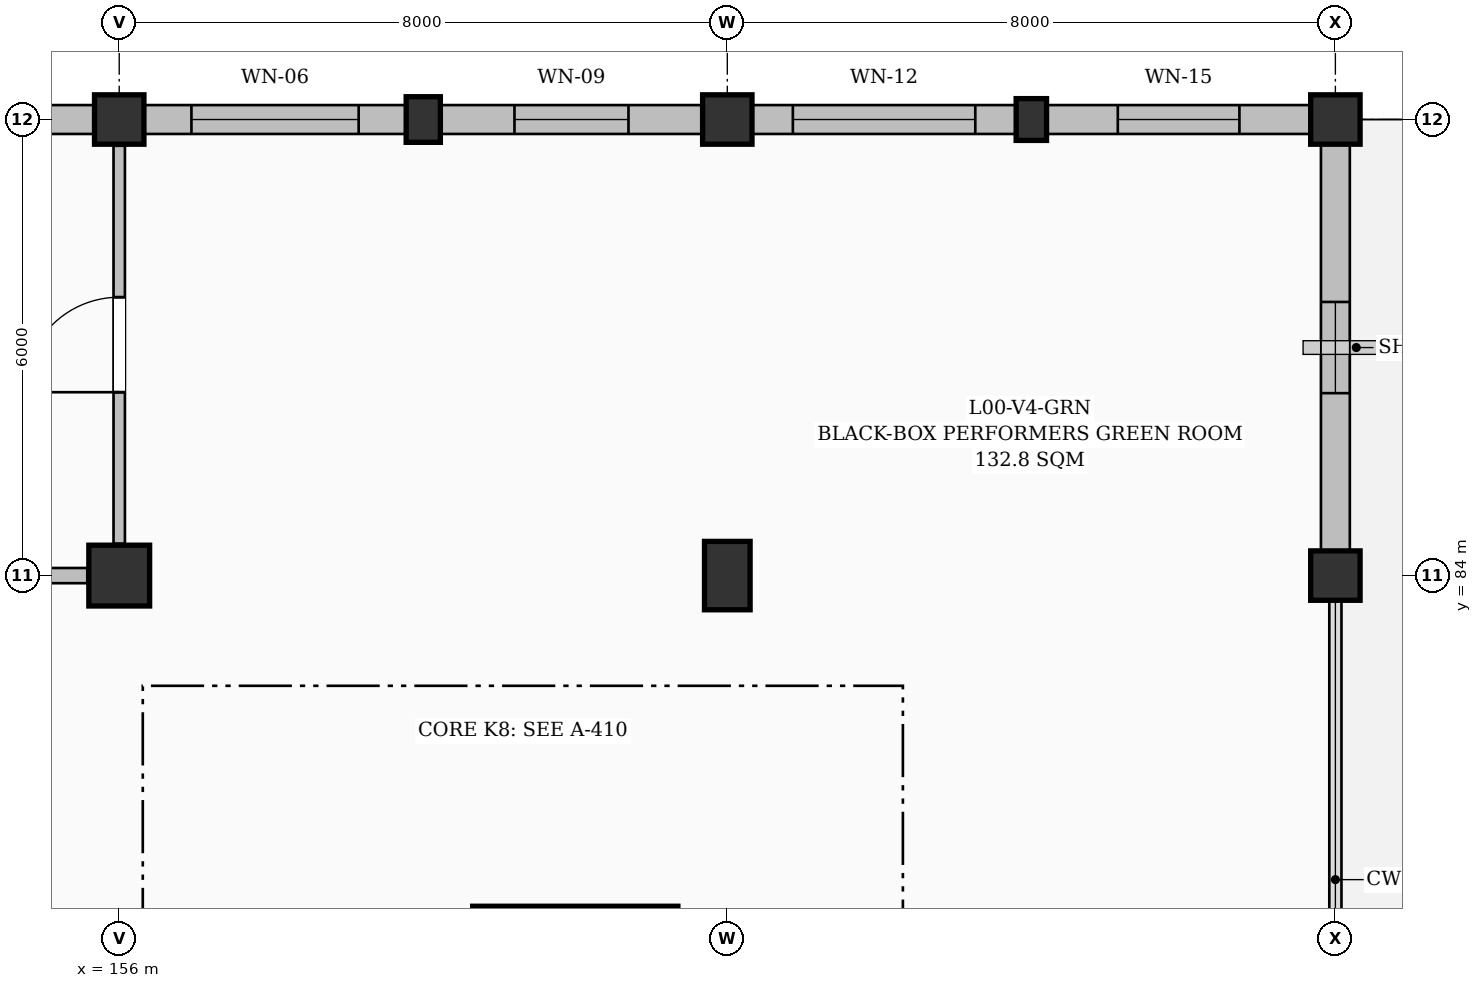
"""IFC4 building model, lengths in metres.
Left out: names, types, materials, properties, quantities, classifications, styles, units other than length and angle.
Written with IfcOpenShell. Run it as: python <this file> out.ifc"""

import sys

from ifc_helpers import new_model, si_unit, direction, frame, frame_2d, origin, origin_2d, place, context, subcontext, project, spatial, rectangle, extrude, element, fill, save


model = new_model("IFC4")
c1 = context("Model", 3, precision=1e-05, world=origin(), true_north=direction((0.0, 1.0)))
c2 = subcontext(c1, "Body", "Model", "MODEL_VIEW")
j1 = project(units=[si_unit("LENGTHUNIT", "METRE"), si_unit("PLANEANGLEUNIT", "RADIAN")], contexts=[c1])
p1 = place(None, origin())
s1 = spatial("IfcSite", under=j1, at=p1, CompositionType="ELEMENT")
p2 = place(p1, origin())
s2 = spatial("IfcBuilding", under=s1, at=p2, CompositionType="ELEMENT")
p3 = place(p2, origin())
s3 = spatial("IfcBuildingStorey", under=s2, at=p3, CompositionType="ELEMENT", Elevation=0.0)
p4 = place(p3, frame((156.0, 84.0, 0.0), z_axis=(0.0, 0.0, 1.0), x_axis=(1.0, 0.0, 0.0)))
e1 = element("IfcColumn", 1, at=p4, inside=s3, PredefinedType="COLUMN", context=c2, shape_type="SweptSolid", body=[
    extrude(rectangle(XDim=0.8, YDim=0.8, at=origin_2d()), origin(), (0.0, 0.0, 1.0), 4.8),
])
p5 = place(p3, frame((156.0, 90.0, 0.0), z_axis=(0.0, 0.0, 1.0), x_axis=(1.0, 0.0, 0.0)))
e2 = element("IfcColumn", 2, at=p5, inside=s3, PredefinedType="COLUMN", context=c2, shape_type="SweptSolid", body=[
    extrude(rectangle(XDim=0.65, YDim=0.65, at=origin_2d()), origin(), (0.0, 0.0, 1.0), 4.8),
])
p6 = place(p3, frame((160.0, 90.0, 0.0), z_axis=(0.0, 0.0, 1.0), x_axis=(1.0, 0.0, 0.0)))
e3 = element("IfcColumn", 3, at=p6, inside=s3, PredefinedType="PILASTER", context=c2, shape_type="SweptSolid", body=[
    extrude(rectangle(XDim=0.45, YDim=0.6, at=origin_2d()), origin(), (0.0, 0.0, 1.0), 4.8),
])
p7 = place(p3, frame((164.0, 84.0, 0.0), z_axis=(0.0, 0.0, 1.0), x_axis=(1.0, 0.0, 0.0)))
e4 = element("IfcColumn", 4, at=p7, inside=s3, PredefinedType="COLUMN", context=c2, shape_type="SweptSolid", body=[
    extrude(rectangle(XDim=0.6, YDim=0.9, at=origin_2d()), origin(), (0.0, 0.0, 1.0), 4.8),
])
p8 = place(p3, frame((164.0, 90.0, 0.0), z_axis=(0.0, 0.0, 1.0), x_axis=(1.0, 0.0, 0.0)))
e5 = element("IfcColumn", 5, at=p8, inside=s3, PredefinedType="COLUMN", context=c2, shape_type="SweptSolid", body=[
    extrude(rectangle(XDim=0.65, YDim=0.65, at=origin_2d()), origin(), (0.0, 0.0, 1.0), 4.8),
])
p9 = place(p3, frame((168.0, 90.0, 0.0), z_axis=(0.0, 0.0, 1.0), x_axis=(1.0, 0.0, 0.0)))
e6 = element("IfcColumn", 6, at=p9, inside=s3, PredefinedType="PILASTER", context=c2, shape_type="SweptSolid", body=[
    extrude(rectangle(XDim=0.4, YDim=0.55, at=origin_2d()), origin(), (0.0, 0.0, 1.0), 4.8),
])
for number, where, z_axis, x_axis in (
    (7, (172.0, 84.0, 0.0), (0.0, 0.0, 1.0), (1.0, 0.0, 0.0)),
    (8, (172.0, 90.0, 0.0), (0.0, 0.0, 1.0), (1.0, 0.0, 0.0)),
):
    element("IfcColumn", number, at=place(p3, frame(where, z_axis=z_axis, x_axis=x_axis)), inside=s3, PredefinedType="COLUMN", context=c2, shape_type="SweptSolid", body=[
        extrude(rectangle(XDim=0.65, YDim=0.65, at=origin_2d()), origin(), (0.0, 0.0, 1.0), 4.8),
    ])
p10 = place(p3, frame((152.25, 90.0, 0.0), z_axis=(0.0, 0.0, 1.0), x_axis=(1.0, 0.0, 0.0)))
e9 = element("IfcWall", 9, at=p10, inside=s3, PredefinedType="SOLIDWALL", context=c2, shape_type="SweptSolid", body=[
    extrude(rectangle(XDim=3.425, YDim=0.38, at=frame_2d((1.712, 0.0))), origin(), (0.0, 0.0, 1.0), 3.935),
])
p11 = place(p10, frame((0.913, 0.0, 0.95)))
e10 = element("IfcOpeningElement", 10, at=p11, cuts=e9, PredefinedType="OPENING", context=c2, shape_type="SweptSolid", body=[
    extrude(rectangle(XDim=1.6, YDim=1.8, at=frame_2d((0.8, 0.9))), frame((0.0, 0.2, 0.0), z_axis=(0.0, -1.0, 0.0), x_axis=(1.0, 0.0, 0.0)), (0.0, 0.0, 1.0), 0.4),
])
p12 = place(p3, frame((156.325, 90.0, 0.0), z_axis=(0.0, 0.0, 1.0), x_axis=(1.0, 0.0, 0.0)))
e11 = element("IfcWall", 11, at=p12, inside=s3, PredefinedType="SOLIDWALL", context=c2, shape_type="SweptSolid", body=[
    extrude(rectangle(XDim=3.45, YDim=0.38, at=frame_2d((1.725, 0.0))), origin(), (0.0, 0.0, 1.0), 4.235),
])
p13 = place(p12, frame((0.625, 0.0, 0.95)))
e12 = element("IfcOpeningElement", 12, at=p13, cuts=e11, PredefinedType="OPENING", context=c2, shape_type="SweptSolid", body=[
    extrude(rectangle(XDim=2.2, YDim=1.8, at=frame_2d((1.1, 0.9))), frame((0.0, 0.2, 0.0), z_axis=(0.0, -1.0, 0.0), x_axis=(1.0, 0.0, 0.0)), (0.0, 0.0, 1.0), 0.4),
])
p14 = place(p3, frame((160.225, 90.0, 0.0), z_axis=(0.0, 0.0, 1.0), x_axis=(1.0, 0.0, 0.0)))
e13 = element("IfcWall", 13, at=p14, inside=s3, PredefinedType="SOLIDWALL", context=c2, shape_type="SweptSolid", body=[
    extrude(rectangle(XDim=3.45, YDim=0.38, at=frame_2d((1.725, 0.0))), origin(), (0.0, 0.0, 1.0), 4.235),
])
p15 = place(p14, frame((0.975, 0.0, 0.95)))
e14 = element("IfcOpeningElement", 14, at=p15, cuts=e13, PredefinedType="OPENING", context=c2, shape_type="SweptSolid", body=[
    extrude(rectangle(XDim=1.5, YDim=1.5, at=frame_2d((0.75, 0.75))), frame((0.0, 0.2, 0.0), z_axis=(0.0, -1.0, 0.0), x_axis=(1.0, 0.0, 0.0)), (0.0, 0.0, 1.0), 0.4),
])
p16 = place(p3, frame((164.325, 90.0, 0.0), z_axis=(0.0, 0.0, 1.0), x_axis=(1.0, 0.0, 0.0)))
e15 = element("IfcWall", 15, at=p16, inside=s3, PredefinedType="SOLIDWALL", context=c2, shape_type="SweptSolid", body=[
    extrude(rectangle(XDim=3.475, YDim=0.38, at=frame_2d((1.738, 0.0))), origin(), (0.0, 0.0, 1.0), 4.035),
])
p17 = place(p16, frame((0.538, 0.0, 0.95)))
e16 = element("IfcOpeningElement", 16, at=p17, cuts=e15, PredefinedType="OPENING", context=c2, shape_type="SweptSolid", body=[
    extrude(rectangle(XDim=2.4, YDim=1.5, at=frame_2d((1.2, 0.75))), frame((0.0, 0.2, 0.0), z_axis=(0.0, -1.0, 0.0), x_axis=(1.0, 0.0, 0.0)), (0.0, 0.0, 1.0), 0.4),
])
p18 = place(p3, frame((168.2, 90.0, 0.0), z_axis=(0.0, 0.0, 1.0), x_axis=(1.0, 0.0, 0.0)))
e17 = element("IfcWall", 17, at=p18, inside=s3, PredefinedType="SOLIDWALL", context=c2, shape_type="SweptSolid", body=[
    extrude(rectangle(XDim=3.475, YDim=0.38, at=frame_2d((1.738, 0.0))), origin(), (0.0, 0.0, 1.0), 4.035),
])
p19 = place(p18, frame((0.938, 0.0, 0.95)))
e18 = element("IfcOpeningElement", 18, at=p19, cuts=e17, PredefinedType="OPENING", context=c2, shape_type="SweptSolid", body=[
    extrude(rectangle(XDim=1.6, YDim=1.2, at=frame_2d((0.8, 0.6))), frame((0.0, 0.2, 0.0), z_axis=(0.0, -1.0, 0.0), x_axis=(1.0, 0.0, 0.0)), (0.0, 0.0, 1.0), 0.4),
])
p20 = place(p3, frame((172.0, 89.675, 0.0), z_axis=(0.0, 0.0, 1.0), x_axis=(0.0, -1.0, 0.0)))
e19 = element("IfcWall", 19, at=p20, inside=s3, PredefinedType="SOLIDWALL", context=c2, shape_type="SweptSolid", body=[
    extrude(rectangle(XDim=5.35, YDim=0.38, at=frame_2d((2.675, 0.0))), origin(), (0.0, 0.0, 1.0), 4.335),
])
p21 = place(p20, frame((2.075, 0.0, 0.95)))
e20 = element("IfcOpeningElement", 20, at=p21, cuts=e19, PredefinedType="OPENING", context=c2, shape_type="SweptSolid", body=[
    extrude(rectangle(XDim=1.2, YDim=1.5, at=frame_2d((0.6, 0.75))), frame((0.0, 0.2, 0.0), z_axis=(0.0, -1.0, 0.0), x_axis=(1.0, 0.0, 0.0)), (0.0, 0.0, 1.0), 0.4),
])
p22 = place(p3, frame((163.35, 79.5, 0.0), z_axis=(0.0, 0.0, 1.0), x_axis=(-1.0, 0.0, 0.0)))
e21 = element("IfcWall", 21, at=p22, inside=s3, PredefinedType="SHEAR", context=c2, shape_type="SweptSolid", body=[
    extrude(rectangle(XDim=2.7, YDim=0.3, at=frame_2d((1.35, 0.0))), origin(), (0.0, 0.0, 1.0), 4.55),
])
p23 = place(p3, frame((140.42, 84.0, 0.0), z_axis=(0.0, 0.0, 1.0), x_axis=(1.0, 0.0, 0.0)))
e22 = element("IfcWall", 22, at=p23, inside=s3, PredefinedType="PARTITIONING", context=c2, shape_type="SweptSolid", body=[
    extrude(rectangle(XDim=15.16, YDim=0.2, at=frame_2d((7.58, 0.0))), origin(), (0.0, 0.0, 1.0), 3.685),
])
p24 = place(p23, frame((4.861, 0.0, 0.0)))
e23 = element("IfcOpeningElement", 23, at=p24, cuts=e22, PredefinedType="OPENING", context=c2, shape_type="SweptSolid", body=[
    extrude(rectangle(XDim=1.8, YDim=2.35, at=frame_2d((0.9, 1.175))), frame((0.0, 0.11, 0.0), z_axis=(0.0, -1.0, 0.0), x_axis=(1.0, 0.0, 0.0)), (0.0, 0.0, 1.0), 0.22),
])
p25 = place(p3, frame((156.0, 84.42, 0.0), z_axis=(0.0, 0.0, 1.0), x_axis=(0.0, 1.0, 0.0)))
e24 = element("IfcWall", 24, at=p25, inside=s3, PredefinedType="PARTITIONING", context=c2, shape_type="SweptSolid", body=[
    extrude(rectangle(XDim=5.235, YDim=0.15, at=frame_2d((2.618, 0.0))), origin(), (0.0, 0.0, 1.0), 3.685),
])
p26 = place(p25, frame((1.992, 0.0, 0.0)))
e25 = element("IfcOpeningElement", 25, at=p26, cuts=e24, PredefinedType="OPENING", context=c2, shape_type="SweptSolid", body=[
    extrude(rectangle(XDim=1.25, YDim=2.15, at=frame_2d((0.625, 1.075))), frame((0.0, 0.085, 0.0), z_axis=(0.0, -1.0, 0.0), x_axis=(1.0, 0.0, 0.0)), (0.0, 0.0, 1.0), 0.17),
])
p27 = place(p13, origin())
e26 = element("IfcWindow", 26, at=p27, inside=s3, PartitioningType="TRIPLE_PANEL_VERTICAL", PredefinedType="WINDOW", context=c2, shape_type="SweptSolid", body=[
    extrude(rectangle(XDim=2.2, YDim=1.8, at=frame_2d((1.1, 0.9))), frame((0.0, 0.03, 0.0), z_axis=(0.0, -1.0, 0.0), x_axis=(1.0, 0.0, 0.0)), (0.0, 0.0, 1.0), 0.06),
])
fill(e12, e26)
p28 = place(p15, origin())
e27 = element("IfcWindow", 27, at=p28, inside=s3, PartitioningType="DOUBLE_PANEL_VERTICAL", PredefinedType="WINDOW", context=c2, shape_type="SweptSolid", body=[
    extrude(rectangle(XDim=1.5, YDim=1.5, at=frame_2d((0.75, 0.75))), frame((0.0, 0.03, 0.0), z_axis=(0.0, -1.0, 0.0), x_axis=(1.0, 0.0, 0.0)), (0.0, 0.0, 1.0), 0.06),
])
fill(e14, e27)
p29 = place(p17, origin())
e28 = element("IfcWindow", 28, at=p29, inside=s3, PartitioningType="TRIPLE_PANEL_VERTICAL", PredefinedType="WINDOW", context=c2, shape_type="SweptSolid", body=[
    extrude(rectangle(XDim=2.4, YDim=1.5, at=frame_2d((1.2, 0.75))), frame((0.0, 0.03, 0.0), z_axis=(0.0, -1.0, 0.0), x_axis=(1.0, 0.0, 0.0)), (0.0, 0.0, 1.0), 0.06),
])
fill(e16, e28)
p30 = place(p19, origin())
e29 = element("IfcWindow", 29, at=p30, inside=s3, PartitioningType="DOUBLE_PANEL_HORIZONTAL", PredefinedType="WINDOW", context=c2, shape_type="SweptSolid", body=[
    extrude(rectangle(XDim=1.6, YDim=1.2, at=frame_2d((0.8, 0.6))), frame((0.0, 0.03, 0.0), z_axis=(0.0, -1.0, 0.0), x_axis=(1.0, 0.0, 0.0)), (0.0, 0.0, 1.0), 0.06),
])
fill(e18, e29)
p31 = place(p21, origin())
e30 = element("IfcWindow", 30, at=p31, inside=s3, PartitioningType="SINGLE_PANEL", PredefinedType="WINDOW", context=c2, shape_type="SweptSolid", body=[
    extrude(rectangle(XDim=1.2, YDim=1.5, at=frame_2d((0.6, 0.75))), frame((0.0, 0.03, 0.0), z_axis=(0.0, -1.0, 0.0), x_axis=(1.0, 0.0, 0.0)), (0.0, 0.0, 1.0), 0.06),
])
fill(e20, e30)
p32 = place(p26, origin())
e31 = element("IfcDoor", 31, at=p32, inside=s3, OperationType="SINGLE_SWING_LEFT", PredefinedType="DOOR", context=c2, shape_type="SweptSolid", body=[
    extrude(rectangle(XDim=1.25, YDim=2.15, at=frame_2d((0.625, 1.075))), frame((0.0, 0.025, 0.0), z_axis=(0.0, -1.0, 0.0), x_axis=(1.0, 0.0, 0.0)), (0.0, 0.0, 1.0), 0.05),
])
fill(e25, e31)
save(model, sys.argv[1])
